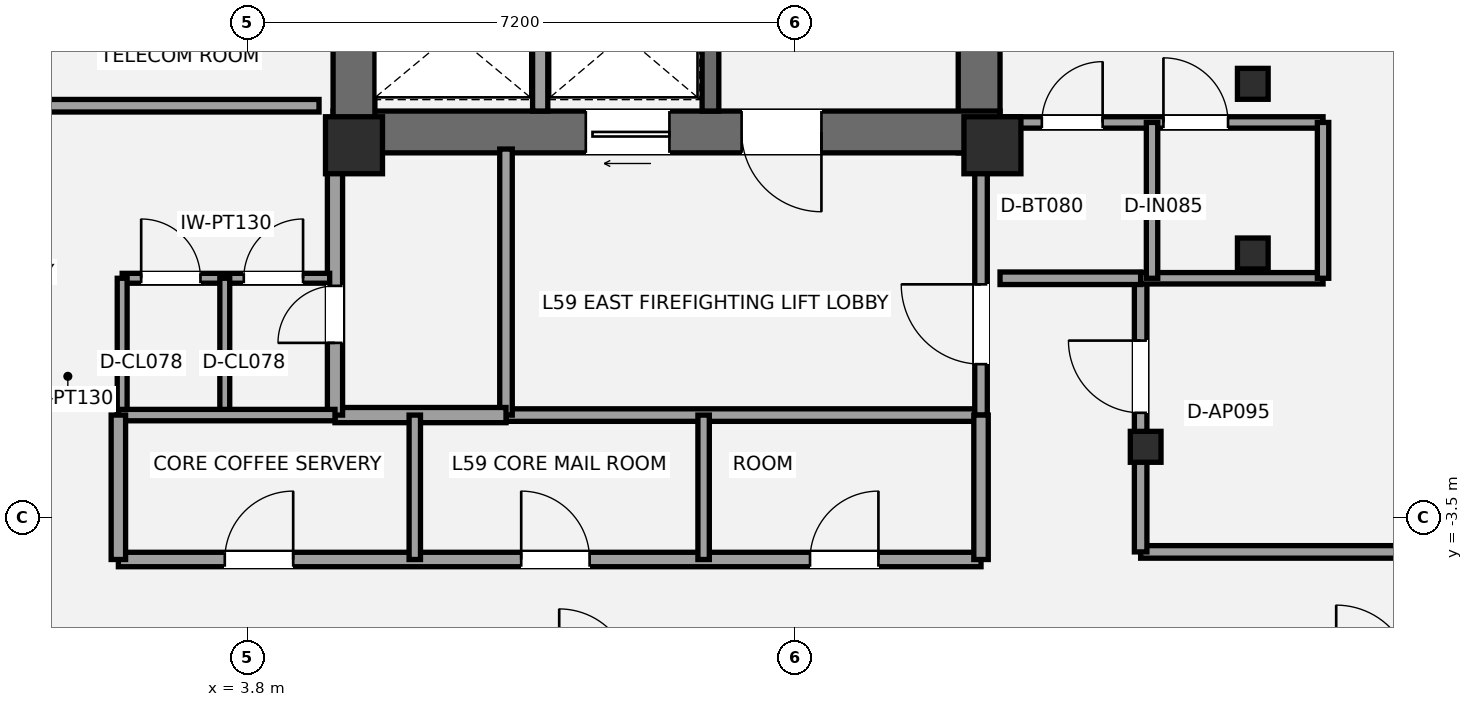
"""IFC4 building model, lengths in metres.
Left out: names, types, materials, properties, quantities, classifications, styles, units other than length and angle.
Written with IfcOpenShell. Run it as: python <this file> out.ifc"""

import sys

from ifc_helpers import new_model, si_unit, direction, frame, frame_2d, origin, origin_2d, place, context, subcontext, project, spatial, rectangle, i_section, extrude, element, fill, save


model = new_model("IFC4")
c1 = context("Model", 3, precision=1e-05, world=origin(), true_north=direction((0.0, 1.0)))
c2 = subcontext(c1, "Body", "Model", "MODEL_VIEW")
j1 = project(units=[si_unit("LENGTHUNIT", "METRE"), si_unit("PLANEANGLEUNIT", "RADIAN")], contexts=[c1])
p1 = place(None, origin())
s1 = spatial("IfcSite", under=j1, at=p1, CompositionType="ELEMENT")
p2 = place(p1, origin())
s2 = spatial("IfcBuilding", under=s1, at=p2, CompositionType="ELEMENT")
p3 = place(p2, frame((0.0, 0.0, 213.15)))
s3 = spatial("IfcBuildingStorey", under=s2, at=p3, CompositionType="ELEMENT", Elevation=213.15)
p4 = place(p3, frame((13.425, 1.3, 0.0), z_axis=(0.0, 0.0, 1.0), x_axis=(0.0, 1.0, 0.0)))
e1 = element("IfcWall", 1, at=p4, inside=s3, PredefinedType="SHEAR", context=c2, shape_type="SweptSolid", body=[
    extrude(rectangle(XDim=8.25, YDim=0.55, at=frame_2d((4.125, 0.0))), origin(), (0.0, 0.0, 1.0), 3.15),
])
p5 = place(p3, frame((13.7, 1.575, 0.0), z_axis=(0.0, 0.0, 1.0), x_axis=(-1.0, 0.0, 0.0)))
e2 = element("IfcWall", 2, at=p5, inside=s3, PredefinedType="SHEAR", context=c2, shape_type="SweptSolid", body=[
    extrude(rectangle(XDim=8.775, YDim=0.55, at=frame_2d((4.387, 0.0))), origin(), (0.0, 0.0, 1.0), 3.15),
])
p6 = place(p5, frame((2.35, 0.0, 0.0)))
e3 = element("IfcOpeningElement", 3, at=p6, cuts=e2, PredefinedType="OPENING", context=c2, shape_type="SweptSolid", body=[
    extrude(rectangle(XDim=1.05, YDim=2.15, at=frame_2d((0.525, 1.075))), frame((0.0, 0.285, 0.0), z_axis=(0.0, -1.0, 0.0), x_axis=(1.0, 0.0, 0.0)), (0.0, 0.0, 1.0), 0.57),
])
p7 = place(p5, frame((4.35, 0.0, 0.0)))
e4 = element("IfcOpeningElement", 4, at=p7, cuts=e2, PredefinedType="OPENING", context=c2, shape_type="SweptSolid", body=[
    extrude(rectangle(XDim=1.1, YDim=2.2, at=frame_2d((0.55, 1.1))), frame((0.0, 0.285, 0.0), z_axis=(0.0, -1.0, 0.0), x_axis=(1.0, 0.0, 0.0)), (0.0, 0.0, 1.0), 0.57),
])
p8 = place(p3, frame((5.2, 1.3, 0.0), z_axis=(0.0, 0.0, 1.0), x_axis=(0.0, 1.0, 0.0)))
e5 = element("IfcWall", 5, at=p8, inside=s3, PredefinedType="SHEAR", context=c2, shape_type="SweptSolid", body=[
    extrude(rectangle(XDim=2.5, YDim=0.55, at=frame_2d((1.25, 0.0))), origin(), (0.0, 0.0, 1.0), 3.15),
])
p9 = place(p3, frame((9.89, 1.85, 0.0), z_axis=(0.0, 0.0, 1.0), x_axis=(0.0, 1.0, 0.0)))
e6 = element("IfcWall", 6, at=p9, inside=s3, PredefinedType="SHEAR", context=c2, shape_type="SweptSolid", body=[
    extrude(rectangle(XDim=7.15, YDim=0.22, at=frame_2d((3.575, 0.0))), origin(), (0.0, 0.0, 1.0), 3.15),
])
for number, where, z_axis, x_axis in (
    (7, (5.2, 1.4, 0.0), (0.0, 0.0, 1.0), (1.0, 0.0, 0.0)),
    (8, (13.6, 1.4, 0.0), (0.0, 0.0, 1.0), (1.0, 0.0, 0.0)),
):
    element("IfcColumn", number, at=place(p3, frame(where, z_axis=z_axis, x_axis=x_axis)), inside=s3, PredefinedType="PILASTER", context=c2, shape_type="SweptSolid", body=[
        extrude(rectangle(XDim=0.75, YDim=0.75, at=origin_2d()), origin(), (0.0, 0.0, 1.0), 3.15),
    ])
for number, where, z_axis, x_axis in (
    (9, (17.026, 2.208, 0.0), (0.0, 0.0, 1.0), (1.0, 0.0, 0.0)),
    (10, (15.616, -2.567, 0.0), (0.0, 0.0, 1.0), (1.0, 0.0, 0.0)),
    (11, (17.026, -0.024, 0.0), (0.0, 0.0, 1.0), (1.0, 0.0, 0.0)),
):
    element("IfcColumn", number, at=place(p3, frame(where, z_axis=z_axis, x_axis=x_axis)), inside=s3, PredefinedType="COLUMN", context=c2, shape_type="SweptSolid", body=[
        extrude(i_section(OverallWidth=0.404, OverallDepth=0.407, WebThickness=0.027, FlangeThickness=0.044, at=origin_2d()), origin(), (0.0, 0.0, 1.0), 3.15),
    ])
p10 = place(p3, frame((7.2, -2.15, 0.0), z_axis=(0.0, 0.0, 1.0), x_axis=(1.0, 0.0, 0.0)))
e12 = element("IfcWall", 12, at=p10, inside=s3, PredefinedType="PARTITIONING", context=c2, shape_type="SweptSolid", body=[
    extrude(rectangle(XDim=6.25, YDim=0.165, at=frame_2d((3.125, 0.0))), origin(), (0.0, 0.0, 1.0), 2.423),
])
p11 = place(p3, frame((7.2, -2.15, 0.0), z_axis=(0.0, 0.0, 1.0), x_axis=(0.0, 1.0, 0.0)))
e13 = element("IfcWall", 13, at=p11, inside=s3, PredefinedType="PARTITIONING", context=c2, shape_type="SweptSolid", body=[
    extrude(rectangle(XDim=3.5, YDim=0.165, at=frame_2d((1.75, 0.0))), origin(), (0.0, 0.0, 1.0), 2.423),
])
p12 = place(p3, frame((13.45, -2.15, 0.0), z_axis=(0.0, 0.0, 1.0), x_axis=(0.0, 1.0, 0.0)))
e14 = element("IfcWall", 14, at=p12, inside=s3, PredefinedType="PARTITIONING", context=c2, shape_type="SweptSolid", body=[
    extrude(rectangle(XDim=3.5, YDim=0.165, at=frame_2d((1.75, 0.0))), origin(), (0.0, 0.0, 1.0), 2.423),
])
p13 = place(p12, frame((0.67, 0.0, 0.0)))
e15 = element("IfcOpeningElement", 15, at=p13, cuts=e14, PredefinedType="OPENING", context=c2, shape_type="SweptSolid", body=[
    extrude(rectangle(XDim=1.05, YDim=2.15, at=frame_2d((0.525, 1.075))), frame((0.0, 0.093, 0.0), z_axis=(0.0, -1.0, 0.0), x_axis=(1.0, 0.0, 0.0)), (0.0, 0.0, 1.0), 0.185),
])
p14 = place(p3, frame((4.95, -2.15, 0.0), z_axis=(0.0, 0.0, 1.0), x_axis=(1.0, 0.0, 0.0)))
e16 = element("IfcWall", 16, at=p14, inside=s3, PredefinedType="SOLIDWALL", context=c2, shape_type="SweptSolid", body=[
    extrude(rectangle(XDim=2.25, YDim=0.2, at=frame_2d((1.125, 0.0))), origin(), (0.0, 0.0, 1.0), 2.97),
])
p15 = place(p3, frame((4.95, -2.15, 0.0), z_axis=(0.0, 0.0, 1.0), x_axis=(0.0, 1.0, 0.0)))
e17 = element("IfcWall", 17, at=p15, inside=s3, PredefinedType="SOLIDWALL", context=c2, shape_type="SweptSolid", body=[
    extrude(rectangle(XDim=3.5, YDim=0.2, at=frame_2d((1.75, 0.0))), origin(), (0.0, 0.0, 1.0), 2.423),
])
p16 = place(p15, frame((0.95, 0.0, 0.0)))
e18 = element("IfcOpeningElement", 18, at=p16, cuts=e17, PredefinedType="OPENING", context=c2, shape_type="SweptSolid", body=[
    extrude(rectangle(XDim=0.75, YDim=2.1, at=frame_2d((0.375, 1.05))), frame((0.0, 0.11, 0.0), z_axis=(0.0, -1.0, 0.0), x_axis=(1.0, 0.0, 0.0)), (0.0, 0.0, 1.0), 0.22),
])
p17 = place(p3, frame((2.15, -0.35, 0.0), z_axis=(0.0, 0.0, 1.0), x_axis=(1.0, 0.0, 0.0)))
e19 = element("IfcWall", 19, at=p17, inside=s3, PredefinedType="PARTITIONING", context=c2, shape_type="SweptSolid", body=[
    extrude(rectangle(XDim=2.73, YDim=0.13, at=frame_2d((1.365, 0.0))), origin(), (0.0, 0.0, 1.0), 2.97),
])
p18 = place(p17, frame((0.25, 0.0, 0.0)))
e20 = element("IfcOpeningElement", 20, at=p18, cuts=e19, PredefinedType="OPENING", context=c2, shape_type="SweptSolid", body=[
    extrude(rectangle(XDim=0.78, YDim=2.1, at=frame_2d((0.39, 1.05))), frame((0.0, 0.075, 0.0), z_axis=(0.0, -1.0, 0.0), x_axis=(1.0, 0.0, 0.0)), (0.0, 0.0, 1.0), 0.15),
])
p19 = place(p17, frame((1.6, 0.0, 0.0)))
e21 = element("IfcOpeningElement", 21, at=p19, cuts=e19, PredefinedType="OPENING", context=c2, shape_type="SweptSolid", body=[
    extrude(rectangle(XDim=0.78, YDim=2.1, at=frame_2d((0.39, 1.05))), frame((0.0, 0.075, 0.0), z_axis=(0.0, -1.0, 0.0), x_axis=(1.0, 0.0, 0.0)), (0.0, 0.0, 1.0), 0.15),
])
for number, where, z_axis, x_axis in (
    (22, (2.15, -2.15, 0.0), (0.0, 0.0, 1.0), (0.0, 1.0, 0.0)),
    (23, (3.5, -2.15, 0.0), (0.0, 0.0, 1.0), (0.0, 1.0, 0.0)),
):
    element("IfcWall", number, at=place(p3, frame(where, z_axis=z_axis, x_axis=x_axis)), inside=s3, PredefinedType="PARTITIONING", context=c2, shape_type="SweptSolid", body=[
        extrude(rectangle(XDim=1.8, YDim=0.13, at=frame_2d((0.9, 0.0))), origin(), (0.0, 0.0, 1.0), 2.97),
    ])
p20 = place(p3, frame((7.65, 1.85, 0.0), z_axis=(0.0, 0.0, 1.0), x_axis=(0.0, 1.0, 0.0)))
e24 = element("IfcWall", 24, at=p20, inside=s3, PredefinedType="SOLIDWALL", context=c2, shape_type="SweptSolid", body=[
    extrude(rectangle(XDim=1.97, YDim=0.2, at=frame_2d((0.985, 0.0))), origin(), (0.0, 0.0, 1.0), 2.97),
])
p21 = place(p3, frame((0.85, 1.92, 0.0), z_axis=(0.0, 0.0, 1.0), x_axis=(1.0, 0.0, 0.0)))
e25 = element("IfcWall", 25, at=p21, inside=s3, PredefinedType="PARTITIONING", context=c2, shape_type="SweptSolid", body=[
    extrude(rectangle(XDim=3.89, YDim=0.165, at=frame_2d((1.945, 0.0))), origin(), (0.0, 0.0, 1.0), 2.11),
])
p22 = place(p3, frame((2.1, -4.05, 0.0), z_axis=(0.0, 0.0, 1.0), x_axis=(1.0, 0.0, 0.0)))
e26 = element("IfcWall", 26, at=p22, inside=s3, PredefinedType="PLUMBINGWALL", context=c2, shape_type="SweptSolid", body=[
    extrude(rectangle(XDim=11.35, YDim=0.19, at=frame_2d((5.675, 0.0))), origin(), (0.0, 0.0, 1.0), 2.357),
])
p23 = place(p22, frame((1.4, 0.0, 0.0)))
e27 = element("IfcOpeningElement", 27, at=p23, cuts=e26, PredefinedType="OPENING", context=c2, shape_type="SweptSolid", body=[
    extrude(rectangle(XDim=0.9, YDim=2.1, at=frame_2d((0.45, 1.05))), frame((0.0, 0.105, 0.0), z_axis=(0.0, -1.0, 0.0), x_axis=(1.0, 0.0, 0.0)), (0.0, 0.0, 1.0), 0.21),
])
p24 = place(p22, frame((5.3, 0.0, 0.0)))
e28 = element("IfcOpeningElement", 28, at=p24, cuts=e26, PredefinedType="OPENING", context=c2, shape_type="SweptSolid", body=[
    extrude(rectangle(XDim=0.9, YDim=2.1, at=frame_2d((0.45, 1.05))), frame((0.0, 0.105, 0.0), z_axis=(0.0, -1.0, 0.0), x_axis=(1.0, 0.0, 0.0)), (0.0, 0.0, 1.0), 0.21),
])
p25 = place(p22, frame((9.1, 0.0, 0.0)))
e29 = element("IfcOpeningElement", 29, at=p25, cuts=e26, PredefinedType="OPENING", context=c2, shape_type="SweptSolid", body=[
    extrude(rectangle(XDim=0.9, YDim=2.1, at=frame_2d((0.45, 1.05))), frame((0.0, 0.105, 0.0), z_axis=(0.0, -1.0, 0.0), x_axis=(1.0, 0.0, 0.0)), (0.0, 0.0, 1.0), 0.21),
])
p26 = place(p3, frame((2.1, -2.15, 0.0), z_axis=(0.0, 0.0, 1.0), x_axis=(1.0, 0.0, 0.0)))
e30 = element("IfcWall", 30, at=p26, inside=s3, PredefinedType="PLUMBINGWALL", context=c2, shape_type="SweptSolid", body=[
    extrude(rectangle(XDim=2.85, YDim=0.15, at=frame_2d((1.425, 0.0))), origin(), (0.0, 0.0, 1.0), 2.97),
])
p27 = place(p3, frame((2.1, -4.05, 0.0), z_axis=(0.0, 0.0, 1.0), x_axis=(0.0, 1.0, 0.0)))
e31 = element("IfcWall", 31, at=p27, inside=s3, PredefinedType="PLUMBINGWALL", context=c2, shape_type="SweptSolid", body=[
    extrude(rectangle(XDim=1.9, YDim=0.19, at=frame_2d((0.95, 0.0))), origin(), (0.0, 0.0, 1.0), 2.97),
])
p28 = place(p3, frame((13.45, -4.05, 0.0), z_axis=(0.0, 0.0, 1.0), x_axis=(0.0, 1.0, 0.0)))
e32 = element("IfcWall", 32, at=p28, inside=s3, PredefinedType="PLUMBINGWALL", context=c2, shape_type="SweptSolid", body=[
    extrude(rectangle(XDim=1.9, YDim=0.19, at=frame_2d((0.95, 0.0))), origin(), (0.0, 0.0, 1.0), 2.423),
])
p29 = place(p3, frame((6.0, -4.05, 0.0), z_axis=(0.0, 0.0, 1.0), x_axis=(0.0, 1.0, 0.0)))
e33 = element("IfcWall", 33, at=p29, inside=s3, PredefinedType="PLUMBINGWALL", context=c2, shape_type="SweptSolid", body=[
    extrude(rectangle(XDim=1.9, YDim=0.15, at=frame_2d((0.95, 0.0))), origin(), (0.0, 0.0, 1.0), 2.431),
])
p30 = place(p3, frame((9.8, -4.05, 0.0), z_axis=(0.0, 0.0, 1.0), x_axis=(0.0, 1.0, 0.0)))
e34 = element("IfcWall", 34, at=p30, inside=s3, PredefinedType="PLUMBINGWALL", context=c2, shape_type="SweptSolid", body=[
    extrude(rectangle(XDim=1.9, YDim=0.15, at=frame_2d((0.95, 0.0))), origin(), (0.0, 0.0, 1.0), 2.97),
])
p31 = place(p3, frame((15.55, -3.95, 0.0), z_axis=(0.0, 0.0, 1.0), x_axis=(1.0, 0.0, 0.0)))
e35 = element("IfcWall", 35, at=p31, inside=s3, PredefinedType="PARTITIONING", context=c2, shape_type="SweptSolid", body=[
    extrude(rectangle(XDim=6.476, YDim=0.165, at=frame_2d((3.238, 0.0))), origin(), (0.0, 0.0, 1.0), 2.423),
])
p32 = place(p3, frame((15.55, -3.95, 0.0), z_axis=(0.0, 0.0, 1.0), x_axis=(0.0, 1.0, 0.0)))
e36 = element("IfcWall", 36, at=p32, inside=s3, PredefinedType="PARTITIONING", context=c2, shape_type="SweptSolid", body=[
    extrude(rectangle(XDim=3.6, YDim=0.165, at=frame_2d((1.8, 0.0))), origin(), (0.0, 0.0, 1.0), 2.357),
])
p33 = place(p32, frame((1.83, 0.0, 0.0)))
e37 = element("IfcOpeningElement", 37, at=p33, cuts=e36, PredefinedType="OPENING", context=c2, shape_type="SweptSolid", body=[
    extrude(rectangle(XDim=0.95, YDim=2.15, at=frame_2d((0.475, 1.075))), frame((0.0, 0.093, 0.0), z_axis=(0.0, -1.0, 0.0), x_axis=(1.0, 0.0, 0.0)), (0.0, 0.0, 1.0), 0.185),
])
p34 = place(p3, frame((13.7, -0.35, 0.0), z_axis=(0.0, 0.0, 1.0), x_axis=(1.0, 0.0, 0.0)))
e38 = element("IfcWall", 38, at=p34, inside=s3, PredefinedType="PARTITIONING", context=c2, shape_type="SweptSolid", body=[
    extrude(rectangle(XDim=1.85, YDim=0.165, at=frame_2d((0.925, 0.0))), origin(), (0.0, 0.0, 1.0), 2.423),
])
p35 = place(p3, frame((13.7, 1.7, 0.0), z_axis=(0.0, 0.0, 1.0), x_axis=(1.0, 0.0, 0.0)))
e39 = element("IfcWall", 39, at=p35, inside=s3, PredefinedType="PLUMBINGWALL", context=c2, shape_type="SweptSolid", body=[
    extrude(rectangle(XDim=4.25, YDim=0.15, at=frame_2d((2.125, 0.0))), origin(), (0.0, 0.0, 1.0), 2.423),
])
p36 = place(p35, frame((0.55, 0.0, 0.0)))
e40 = element("IfcOpeningElement", 40, at=p36, cuts=e39, PredefinedType="OPENING", context=c2, shape_type="SweptSolid", body=[
    extrude(rectangle(XDim=0.8, YDim=2.1, at=frame_2d((0.4, 1.05))), frame((0.0, 0.085, 0.0), z_axis=(0.0, -1.0, 0.0), x_axis=(1.0, 0.0, 0.0)), (0.0, 0.0, 1.0), 0.17),
])
p37 = place(p35, frame((2.15, 0.0, 0.0)))
e41 = element("IfcOpeningElement", 41, at=p37, cuts=e39, PredefinedType="OPENING", context=c2, shape_type="SweptSolid", body=[
    extrude(rectangle(XDim=0.85, YDim=2.1, at=frame_2d((0.425, 1.05))), frame((0.0, 0.085, 0.0), z_axis=(0.0, -1.0, 0.0), x_axis=(1.0, 0.0, 0.0)), (0.0, 0.0, 1.0), 0.17),
])
p38 = place(p3, frame((15.55, -0.35, 0.0), z_axis=(0.0, 0.0, 1.0), x_axis=(1.0, 0.0, 0.0)))
e42 = element("IfcWall", 42, at=p38, inside=s3, PredefinedType="PLUMBINGWALL", context=c2, shape_type="SweptSolid", body=[
    extrude(rectangle(XDim=2.4, YDim=0.15, at=frame_2d((1.2, 0.0))), origin(), (0.0, 0.0, 1.0), 2.423),
])
for number, where, z_axis, x_axis in (
    (43, (15.7, -0.35, 0.0), (0.0, 0.0, 1.0), (0.0, 1.0, 0.0)),
    (44, (17.95, -0.35, 0.0), (0.0, 0.0, 1.0), (0.0, 1.0, 0.0)),
):
    element("IfcWall", number, at=place(p3, frame(where, z_axis=z_axis, x_axis=x_axis)), inside=s3, PredefinedType="PLUMBINGWALL", context=c2, shape_type="SweptSolid", body=[
        extrude(rectangle(XDim=2.05, YDim=0.15, at=frame_2d((1.025, 0.0))), origin(), (0.0, 0.0, 1.0), 2.97),
    ])
p39 = place(p6, origin())
e45 = element("IfcDoor", 45, at=p39, inside=s3, OperationType="SINGLE_SWING_LEFT", PredefinedType="DOOR", context=c2, shape_type="SweptSolid", body=[
    extrude(rectangle(XDim=1.05, YDim=2.15, at=frame_2d((0.525, 1.075))), frame((0.0, 0.025, 0.0), z_axis=(0.0, -1.0, 0.0), x_axis=(1.0, 0.0, 0.0)), (0.0, 0.0, 1.0), 0.05),
])
fill(e3, e45)
p40 = place(p13, origin())
e46 = element("IfcDoor", 46, at=p40, inside=s3, OperationType="SINGLE_SWING_RIGHT", PredefinedType="DOOR", context=c2, shape_type="SweptSolid", body=[
    extrude(rectangle(XDim=1.05, YDim=2.15, at=frame_2d((0.525, 1.075))), frame((0.0, 0.025, 0.0), z_axis=(0.0, -1.0, 0.0), x_axis=(1.0, 0.0, 0.0)), (0.0, 0.0, 1.0), 0.05),
])
fill(e15, e46)
p41 = place(p16, origin())
e47 = element("IfcDoor", 47, at=p41, inside=s3, OperationType="SINGLE_SWING_LEFT", PredefinedType="DOOR", context=c2, shape_type="SweptSolid", body=[
    extrude(rectangle(XDim=0.75, YDim=2.1, at=frame_2d((0.375, 1.05))), frame((0.0, 0.025, 0.0), z_axis=(0.0, -1.0, 0.0), x_axis=(1.0, 0.0, 0.0)), (0.0, 0.0, 1.0), 0.05),
])
fill(e18, e47)
p42 = place(p18, origin())
e48 = element("IfcDoor", 48, at=p42, inside=s3, OperationType="SINGLE_SWING_LEFT", PredefinedType="DOOR", context=c2, shape_type="SweptSolid", body=[
    extrude(rectangle(XDim=0.78, YDim=2.1, at=frame_2d((0.39, 1.05))), frame((0.0, 0.025, 0.0), z_axis=(0.0, -1.0, 0.0), x_axis=(1.0, 0.0, 0.0)), (0.0, 0.0, 1.0), 0.05),
])
fill(e20, e48)
p43 = place(p19, origin())
e49 = element("IfcDoor", 49, at=p43, inside=s3, OperationType="SINGLE_SWING_RIGHT", PredefinedType="DOOR", context=c2, shape_type="SweptSolid", body=[
    extrude(rectangle(XDim=0.78, YDim=2.1, at=frame_2d((0.39, 1.05))), frame((0.0, 0.025, 0.0), z_axis=(0.0, -1.0, 0.0), x_axis=(1.0, 0.0, 0.0)), (0.0, 0.0, 1.0), 0.05),
])
fill(e21, e49)
p44 = place(p7, origin())
e50 = element("IfcDoor", 50, at=p44, inside=s3, OperationType="SLIDING_TO_LEFT", PredefinedType="DOOR", context=c2, shape_type="SweptSolid", body=[
    extrude(rectangle(XDim=1.1, YDim=2.2, at=frame_2d((0.55, 1.1))), frame((0.0, 0.025, 0.0), z_axis=(0.0, -1.0, 0.0), x_axis=(1.0, 0.0, 0.0)), (0.0, 0.0, 1.0), 0.05),
])
fill(e4, e50)
p45 = place(p23, origin())
e51 = element("IfcDoor", 51, at=p45, inside=s3, OperationType="SINGLE_SWING_RIGHT", PredefinedType="DOOR", context=c2, shape_type="SweptSolid", body=[
    extrude(rectangle(XDim=0.9, YDim=2.1, at=frame_2d((0.45, 1.05))), frame((0.0, 0.025, 0.0), z_axis=(0.0, -1.0, 0.0), x_axis=(1.0, 0.0, 0.0)), (0.0, 0.0, 1.0), 0.05),
])
fill(e27, e51)
p46 = place(p24, origin())
e52 = element("IfcDoor", 52, at=p46, inside=s3, OperationType="SINGLE_SWING_LEFT", PredefinedType="DOOR", context=c2, shape_type="SweptSolid", body=[
    extrude(rectangle(XDim=0.9, YDim=2.1, at=frame_2d((0.45, 1.05))), frame((0.0, 0.025, 0.0), z_axis=(0.0, -1.0, 0.0), x_axis=(1.0, 0.0, 0.0)), (0.0, 0.0, 1.0), 0.05),
])
fill(e28, e52)
p47 = place(p25, origin())
e53 = element("IfcDoor", 53, at=p47, inside=s3, OperationType="SINGLE_SWING_RIGHT", PredefinedType="DOOR", context=c2, shape_type="SweptSolid", body=[
    extrude(rectangle(XDim=0.9, YDim=2.1, at=frame_2d((0.45, 1.05))), frame((0.0, 0.025, 0.0), z_axis=(0.0, -1.0, 0.0), x_axis=(1.0, 0.0, 0.0)), (0.0, 0.0, 1.0), 0.05),
])
fill(e29, e53)
p48 = place(p33, origin())
e54 = element("IfcDoor", 54, at=p48, inside=s3, OperationType="SINGLE_SWING_RIGHT", PredefinedType="DOOR", context=c2, shape_type="SweptSolid", body=[
    extrude(rectangle(XDim=0.95, YDim=2.15, at=frame_2d((0.475, 1.075))), frame((0.0, 0.025, 0.0), z_axis=(0.0, -1.0, 0.0), x_axis=(1.0, 0.0, 0.0)), (0.0, 0.0, 1.0), 0.05),
])
fill(e37, e54)
p49 = place(p36, origin())
e55 = element("IfcDoor", 55, at=p49, inside=s3, OperationType="SINGLE_SWING_RIGHT", PredefinedType="DOOR", context=c2, shape_type="SweptSolid", body=[
    extrude(rectangle(XDim=0.8, YDim=2.1, at=frame_2d((0.4, 1.05))), frame((0.0, 0.025, 0.0), z_axis=(0.0, -1.0, 0.0), x_axis=(1.0, 0.0, 0.0)), (0.0, 0.0, 1.0), 0.05),
])
fill(e40, e55)
p50 = place(p37, origin())
e56 = element("IfcDoor", 56, at=p50, inside=s3, OperationType="SINGLE_SWING_LEFT", PredefinedType="DOOR", context=c2, shape_type="SweptSolid", body=[
    extrude(rectangle(XDim=0.85, YDim=2.1, at=frame_2d((0.425, 1.05))), frame((0.0, 0.025, 0.0), z_axis=(0.0, -1.0, 0.0), x_axis=(1.0, 0.0, 0.0)), (0.0, 0.0, 1.0), 0.05),
])
fill(e41, e56)
save(model, sys.argv[1])
